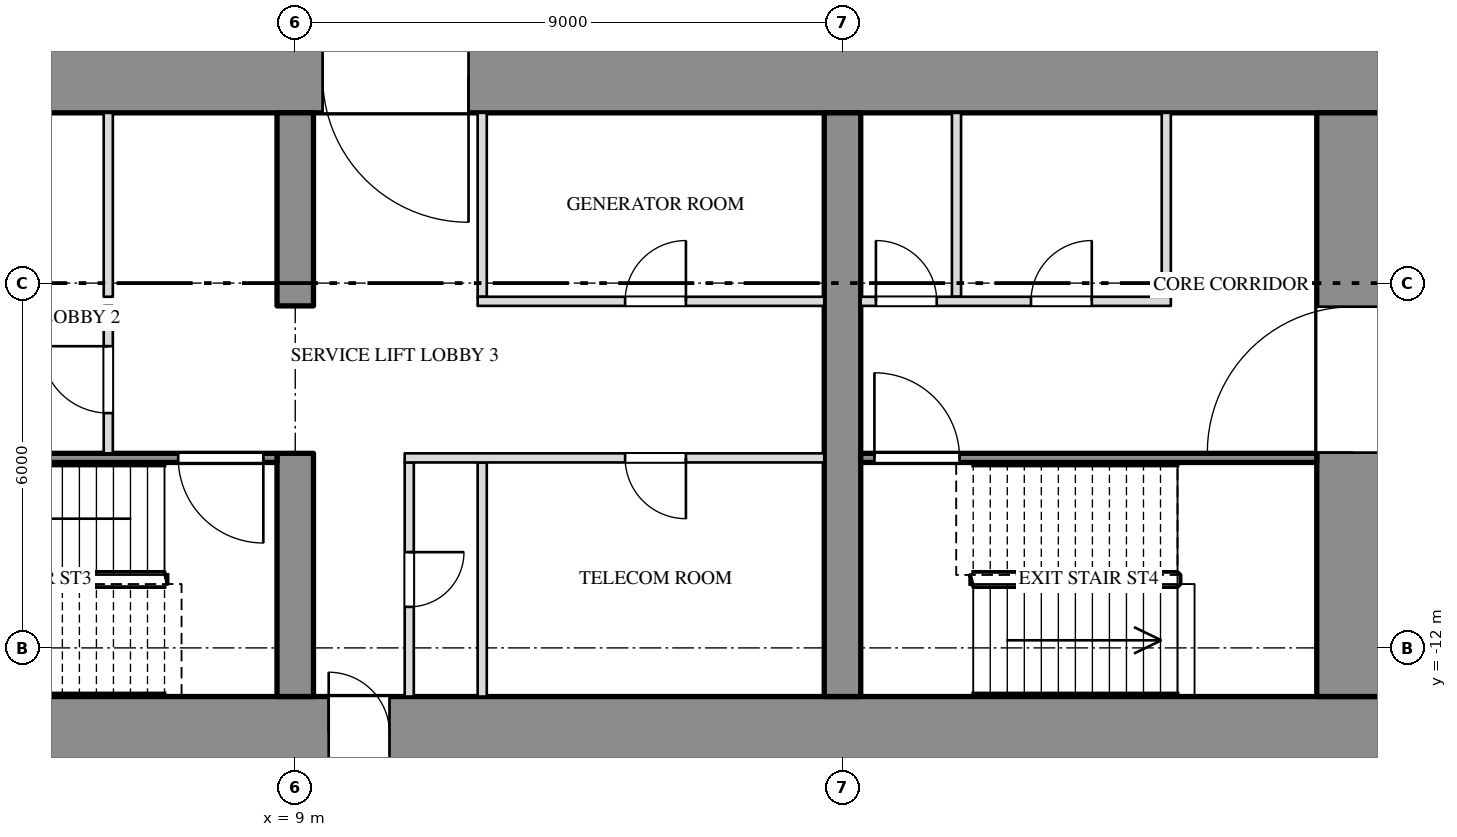
"""IFC4 building model, lengths in metres.
Left out: names, types, materials, properties, quantities, classifications, styles, units other than length and angle.
Written with IfcOpenShell. Run it as: python <this file> out.ifc"""

import sys

from ifc_helpers import new_model, si_unit, direction, frame, frame_2d, origin, place, context, subcontext, project, spatial, rectangle, extrude, element, fill, save


model = new_model("IFC4")
c1 = context("Model", 3, precision=1e-05, world=origin(), true_north=direction((0.0, 1.0)))
c2 = subcontext(c1, "Body", "Model", "MODEL_VIEW")
j1 = project(units=[si_unit("LENGTHUNIT", "METRE"), si_unit("PLANEANGLEUNIT", "RADIAN")], contexts=[c1])
p1 = place(None, origin())
s1 = spatial("IfcSite", under=j1, at=p1, CompositionType="ELEMENT")
p2 = place(p1, origin())
s2 = spatial("IfcBuilding", under=s1, at=p2, CompositionType="ELEMENT")
p3 = place(p2, frame((0.0, 0.0, -12.6)))
s3 = spatial("IfcBuildingStorey", under=s2, at=p3, CompositionType="ELEMENT", Elevation=-12.6)
p4 = place(p3, frame((-27.0, -2.6, 0.0), z_axis=(0.0, 0.0, 1.0), x_axis=(1.0, 0.0, 0.0)))
e1 = element("IfcWall", 1, at=p4, inside=s3, PredefinedType="SHEAR", context=c2, shape_type="SweptSolid", body=[
    extrude(rectangle(XDim=54.0, YDim=1.2, at=frame_2d((27.0, 0.0))), origin(), (0.0, 0.0, 1.0), 3.9),
])
p5 = place(p4, frame((15.15, 0.0, 0.0)))
e2 = element("IfcOpeningElement", 2, at=p5, cuts=e1, PredefinedType="OPENING", context=c2, shape_type="SweptSolid", body=[
    extrude(rectangle(XDim=2.4, YDim=2.1, at=frame_2d((1.2, 1.05))), frame((0.0, 0.612, 0.0), z_axis=(0.0, -1.0, 0.0), x_axis=(1.0, 0.0, 0.0)), (0.0, 0.0, 1.0), 1.224),
])
p6 = place(p4, frame((36.45, 0.0, 0.0)))
e3 = element("IfcOpeningElement", 3, at=p6, cuts=e1, PredefinedType="OPENING", context=c2, shape_type="SweptSolid", body=[
    extrude(rectangle(XDim=2.4, YDim=2.1, at=frame_2d((1.2, 1.05))), frame((0.0, 0.612, 0.0), z_axis=(0.0, -1.0, 0.0), x_axis=(1.0, 0.0, 0.0)), (0.0, 0.0, 1.0), 1.224),
])
p7 = place(p3, frame((-27.0, -13.4, 0.0), z_axis=(0.0, 0.0, 1.0), x_axis=(1.0, 0.0, 0.0)))
e4 = element("IfcWall", 4, at=p7, inside=s3, PredefinedType="SHEAR", context=c2, shape_type="SweptSolid", body=[
    extrude(rectangle(XDim=54.0, YDim=1.2, at=frame_2d((27.0, 0.0))), origin(), (0.0, 0.0, 1.0), 3.9),
])
p8 = place(p7, frame((16.45, 0.0, 0.0)))
e5 = element("IfcOpeningElement", 5, at=p8, cuts=e4, PredefinedType="OPENING", context=c2, shape_type="SweptSolid", body=[
    extrude(rectangle(XDim=1.0, YDim=2.1, at=frame_2d((0.5, 1.05))), frame((0.0, 0.612, 0.0), z_axis=(0.0, -1.0, 0.0), x_axis=(1.0, 0.0, 0.0)), (0.0, 0.0, 1.0), 1.224),
])
p9 = place(p7, frame((36.55, 0.0, 0.0)))
e6 = element("IfcOpeningElement", 6, at=p9, cuts=e4, PredefinedType="OPENING", context=c2, shape_type="SweptSolid", body=[
    extrude(rectangle(XDim=1.0, YDim=2.1, at=frame_2d((0.5, 1.05))), frame((0.0, 0.612, 0.0), z_axis=(0.0, -1.0, 0.0), x_axis=(1.0, 0.0, 0.0)), (0.0, 0.0, 1.0), 1.224),
])
p10 = place(p3, frame((26.4, -12.8, 0.0), z_axis=(0.0, 0.0, 1.0), x_axis=(0.0, 1.0, 0.0)))
e7 = element("IfcWall", 7, at=p10, inside=s3, PredefinedType="SHEAR", context=c2, shape_type="SweptSolid", body=[
    extrude(rectangle(XDim=9.6, YDim=1.2, at=frame_2d((4.8, 0.0))), origin(), (0.0, 0.0, 1.0), 3.9),
])
p11 = place(p10, frame((4.012, 0.0, 0.0)))
e8 = element("IfcOpeningElement", 8, at=p11, cuts=e7, PredefinedType="OPENING", context=c2, shape_type="SweptSolid", body=[
    extrude(rectangle(XDim=2.4, YDim=2.1, at=frame_2d((1.2, 1.05))), frame((0.0, 0.612, 0.0), z_axis=(0.0, -1.0, 0.0), x_axis=(1.0, 0.0, 0.0)), (0.0, 0.0, 1.0), 1.224),
])
p12 = place(p3, frame((9.0, -12.8, 0.0), z_axis=(0.0, 0.0, 1.0), x_axis=(0.0, 1.0, 0.0)))
e9 = element("IfcWall", 9, at=p12, inside=s3, PredefinedType="SHEAR", context=c2, shape_type="SweptSolid", body=[
    extrude(rectangle(XDim=4.0, YDim=0.6, at=frame_2d((2.0, 0.0))), origin(), (0.0, 0.0, 1.0), 3.9),
])
p13 = place(p3, frame((9.0, -6.375, 0.0), z_axis=(0.0, 0.0, 1.0), x_axis=(0.0, 1.0, 0.0)))
e10 = element("IfcWall", 10, at=p13, inside=s3, PredefinedType="SHEAR", context=c2, shape_type="SweptSolid", body=[
    extrude(rectangle(XDim=3.175, YDim=0.6, at=frame_2d((1.587, 0.0))), origin(), (0.0, 0.0, 1.0), 3.9),
])
p14 = place(p3, frame((18.0, -12.8, 0.0), z_axis=(0.0, 0.0, 1.0), x_axis=(0.0, 1.0, 0.0)))
e11 = element("IfcWall", 11, at=p14, inside=s3, PredefinedType="SHEAR", context=c2, shape_type="SweptSolid", body=[
    extrude(rectangle(XDim=9.6, YDim=0.6, at=frame_2d((4.8, 0.0))), origin(), (0.0, 0.0, 1.0), 3.9),
])
for number, where, z_axis, x_axis in (
    (12, (5.925, -6.225, 0.0), (0.0, 0.0, 1.0), (0.0, 1.0, 0.0)),
    (13, (12.075, -6.225, 0.0), (0.0, 0.0, 1.0), (0.0, 1.0, 0.0)),
    (14, (19.875, -6.225, 0.0), (0.0, 0.0, 1.0), (0.0, 1.0, 0.0)),
    (15, (23.325, -6.225, 0.0), (0.0, 0.0, 1.0), (0.0, 1.0, 0.0)),
):
    element("IfcWall", number, at=place(p3, frame(where, z_axis=z_axis, x_axis=x_axis)), inside=s3, PredefinedType="PARTITIONING", context=c2, shape_type="SweptSolid", body=[
        extrude(rectangle(XDim=3.025, YDim=0.15, at=frame_2d((1.513, 0.0))), origin(), (0.0, 0.0, 1.0), 3.9),
    ])
p15 = place(p3, frame((10.875, -12.8, 0.0), z_axis=(0.0, 0.0, 1.0), x_axis=(0.0, 1.0, 0.0)))
e16 = element("IfcWall", 16, at=p15, inside=s3, PredefinedType="PARTITIONING", context=c2, shape_type="SweptSolid", body=[
    extrude(rectangle(XDim=3.85, YDim=0.15, at=frame_2d((1.925, 0.0))), origin(), (0.0, 0.0, 1.0), 3.9),
])
p16 = place(p15, frame((1.475, 0.0, 0.0)))
e17 = element("IfcOpeningElement", 17, at=p16, cuts=e16, PredefinedType="OPENING", context=c2, shape_type="SweptSolid", body=[
    extrude(rectangle(XDim=0.9, YDim=2.1, at=frame_2d((0.45, 1.05))), frame((0.0, 0.087, 0.0), z_axis=(0.0, -1.0, 0.0), x_axis=(1.0, 0.0, 0.0)), (0.0, 0.0, 1.0), 0.174),
])
p17 = place(p3, frame((12.075, -12.8, 0.0), z_axis=(0.0, 0.0, 1.0), x_axis=(0.0, 1.0, 0.0)))
e18 = element("IfcWall", 18, at=p17, inside=s3, PredefinedType="PARTITIONING", context=c2, shape_type="SweptSolid", body=[
    extrude(rectangle(XDim=3.85, YDim=0.15, at=frame_2d((1.925, 0.0))), origin(), (0.0, 0.0, 1.0), 3.9),
])
p18 = place(p3, frame((5.925, -8.8, 0.0), z_axis=(0.0, 0.0, 1.0), x_axis=(0.0, 1.0, 0.0)))
e19 = element("IfcWall", 19, at=p18, inside=s3, PredefinedType="PARTITIONING", context=c2, shape_type="SweptSolid", body=[
    extrude(rectangle(XDim=2.425, YDim=0.15, at=frame_2d((1.212, 0.0))), origin(), (0.0, 0.0, 1.0), 3.9),
])
p19 = place(p18, frame((0.662, 0.0, 0.0)))
e20 = element("IfcOpeningElement", 20, at=p19, cuts=e19, PredefinedType="OPENING", context=c2, shape_type="SweptSolid", body=[
    extrude(rectangle(XDim=1.1, YDim=2.1, at=frame_2d((0.55, 1.05))), frame((0.0, 0.087, 0.0), z_axis=(0.0, -1.0, 0.0), x_axis=(1.0, 0.0, 0.0)), (0.0, 0.0, 1.0), 0.174),
])
p20 = place(p3, frame((12.0, -6.3, 0.0), z_axis=(0.0, 0.0, 1.0), x_axis=(1.0, 0.0, 0.0)))
e21 = element("IfcWall", 21, at=p20, inside=s3, PredefinedType="PARTITIONING", context=c2, shape_type="SweptSolid", body=[
    extrude(rectangle(XDim=5.7, YDim=0.15, at=frame_2d((2.85, 0.0))), origin(), (0.0, 0.0, 1.0), 3.9),
])
p21 = place(p20, frame((2.425, 0.0, 0.0)))
e22 = element("IfcOpeningElement", 22, at=p21, cuts=e21, PredefinedType="OPENING", context=c2, shape_type="SweptSolid", body=[
    extrude(rectangle(XDim=1.0, YDim=2.1, at=frame_2d((0.5, 1.05))), frame((0.0, 0.087, 0.0), z_axis=(0.0, -1.0, 0.0), x_axis=(1.0, 0.0, 0.0)), (0.0, 0.0, 1.0), 0.174),
])
p22 = place(p3, frame((18.3, -6.3, 0.0), z_axis=(0.0, 0.0, 1.0), x_axis=(1.0, 0.0, 0.0)))
e23 = element("IfcWall", 23, at=p22, inside=s3, PredefinedType="PARTITIONING", context=c2, shape_type="SweptSolid", body=[
    extrude(rectangle(XDim=5.1, YDim=0.15, at=frame_2d((2.55, 0.0))), origin(), (0.0, 0.0, 1.0), 3.9),
])
p23 = place(p22, frame((0.25, 0.0, 0.0)))
e24 = element("IfcOpeningElement", 24, at=p23, cuts=e23, PredefinedType="OPENING", context=c2, shape_type="SweptSolid", body=[
    extrude(rectangle(XDim=1.0, YDim=2.1, at=frame_2d((0.5, 1.05))), frame((0.0, 0.087, 0.0), z_axis=(0.0, -1.0, 0.0), x_axis=(1.0, 0.0, 0.0)), (0.0, 0.0, 1.0), 0.174),
])
p24 = place(p22, frame((2.8, 0.0, 0.0)))
e25 = element("IfcOpeningElement", 25, at=p24, cuts=e23, PredefinedType="OPENING", context=c2, shape_type="SweptSolid", body=[
    extrude(rectangle(XDim=1.0, YDim=2.1, at=frame_2d((0.5, 1.05))), frame((0.0, 0.087, 0.0), z_axis=(0.0, -1.0, 0.0), x_axis=(1.0, 0.0, 0.0)), (0.0, 0.0, 1.0), 0.174),
])
p25 = place(p3, frame((0.3, -8.875, 0.0), z_axis=(0.0, 0.0, 1.0), x_axis=(1.0, 0.0, 0.0)))
e26 = element("IfcWall", 26, at=p25, inside=s3, PredefinedType="SHEAR", context=c2, shape_type="SweptSolid", body=[
    extrude(rectangle(XDim=8.4, YDim=0.15, at=frame_2d((4.2, 0.0))), origin(), (0.0, 0.0, 1.0), 3.9),
])
p26 = place(p25, frame((6.775, 0.0, 0.0)))
e27 = element("IfcOpeningElement", 27, at=p26, cuts=e26, PredefinedType="OPENING", context=c2, shape_type="SweptSolid", body=[
    extrude(rectangle(XDim=1.4, YDim=2.1, at=frame_2d((0.7, 1.05))), frame((0.0, 0.087, 0.0), z_axis=(0.0, -1.0, 0.0), x_axis=(1.0, 0.0, 0.0)), (0.0, 0.0, 1.0), 0.174),
])
p27 = place(p3, frame((10.8, -8.875, 0.0), z_axis=(0.0, 0.0, 1.0), x_axis=(1.0, 0.0, 0.0)))
e28 = element("IfcWall", 28, at=p27, inside=s3, PredefinedType="PARTITIONING", context=c2, shape_type="SweptSolid", body=[
    extrude(rectangle(XDim=6.9, YDim=0.15, at=frame_2d((3.45, 0.0))), origin(), (0.0, 0.0, 1.0), 3.9),
])
p28 = place(p27, frame((3.625, 0.0, 0.0)))
e29 = element("IfcOpeningElement", 29, at=p28, cuts=e28, PredefinedType="OPENING", context=c2, shape_type="SweptSolid", body=[
    extrude(rectangle(XDim=1.0, YDim=2.1, at=frame_2d((0.5, 1.05))), frame((0.0, 0.087, 0.0), z_axis=(0.0, -1.0, 0.0), x_axis=(1.0, 0.0, 0.0)), (0.0, 0.0, 1.0), 0.174),
])
p29 = place(p3, frame((18.3, -8.875, 0.0), z_axis=(0.0, 0.0, 1.0), x_axis=(1.0, 0.0, 0.0)))
e30 = element("IfcWall", 30, at=p29, inside=s3, PredefinedType="SHEAR", context=c2, shape_type="SweptSolid", body=[
    extrude(rectangle(XDim=7.5, YDim=0.15, at=frame_2d((3.75, 0.0))), origin(), (0.0, 0.0, 1.0), 3.9),
])
p30 = place(p29, frame((0.225, 0.0, 0.0)))
e31 = element("IfcOpeningElement", 31, at=p30, cuts=e30, PredefinedType="OPENING", context=c2, shape_type="SweptSolid", body=[
    extrude(rectangle(XDim=1.4, YDim=2.1, at=frame_2d((0.7, 1.05))), frame((0.0, 0.087, 0.0), z_axis=(0.0, -1.0, 0.0), x_axis=(1.0, 0.0, 0.0)), (0.0, 0.0, 1.0), 0.174),
])
p31 = place(p19, origin())
e32 = element("IfcDoor", 32, at=p31, inside=s3, OperationType="SINGLE_SWING_RIGHT", PredefinedType="DOOR", context=c2, shape_type="SweptSolid", body=[
    extrude(rectangle(XDim=1.1, YDim=2.1, at=frame_2d((0.55, 1.05))), frame((0.0, 0.025, 0.0), z_axis=(0.0, -1.0, 0.0), x_axis=(1.0, 0.0, 0.0)), (0.0, 0.0, 1.0), 0.05),
])
fill(e20, e32)
p32 = place(p26, origin())
e33 = element("IfcDoor", 33, at=p32, inside=s3, OperationType="DOUBLE_DOOR_SINGLE_SWING", PredefinedType="DOOR", context=c2, shape_type="SweptSolid", body=[
    extrude(rectangle(XDim=1.4, YDim=2.1, at=frame_2d((0.7, 1.05))), frame((0.0, 0.025, 0.0), z_axis=(0.0, -1.0, 0.0), x_axis=(1.0, 0.0, 0.0)), (0.0, 0.0, 1.0), 0.05),
])
fill(e27, e33)
p33 = place(p9, origin())
e34 = element("IfcDoor", 34, at=p33, inside=s3, OperationType="SINGLE_SWING_LEFT", PredefinedType="DOOR", context=c2, shape_type="SweptSolid", body=[
    extrude(rectangle(XDim=1.0, YDim=2.1, at=frame_2d((0.5, 1.05))), frame((0.0, 0.025, 0.0), z_axis=(0.0, -1.0, 0.0), x_axis=(1.0, 0.0, 0.0)), (0.0, 0.0, 1.0), 0.05),
])
fill(e6, e34)
p34 = place(p6, origin())
e35 = element("IfcDoor", 35, at=p34, inside=s3, OperationType="DOUBLE_DOOR_SINGLE_SWING", PredefinedType="DOOR", context=c2, shape_type="SweptSolid", body=[
    extrude(rectangle(XDim=2.4, YDim=2.1, at=frame_2d((1.2, 1.05))), frame((0.0, 0.025, 0.0), z_axis=(0.0, -1.0, 0.0), x_axis=(1.0, 0.0, 0.0)), (0.0, 0.0, 1.0), 0.05),
])
fill(e3, e35)
p35 = place(p16, origin())
e36 = element("IfcDoor", 36, at=p35, inside=s3, OperationType="SINGLE_SWING_LEFT", PredefinedType="DOOR", context=c2, shape_type="SweptSolid", body=[
    extrude(rectangle(XDim=0.9, YDim=2.1, at=frame_2d((0.45, 1.05))), frame((0.0, 0.025, 0.0), z_axis=(0.0, -1.0, 0.0), x_axis=(1.0, 0.0, 0.0)), (0.0, 0.0, 1.0), 0.05),
])
fill(e17, e36)
p36 = place(p28, origin())
e37 = element("IfcDoor", 37, at=p36, inside=s3, OperationType="SINGLE_SWING_LEFT", PredefinedType="DOOR", context=c2, shape_type="SweptSolid", body=[
    extrude(rectangle(XDim=1.0, YDim=2.1, at=frame_2d((0.5, 1.05))), frame((0.0, 0.025, 0.0), z_axis=(0.0, -1.0, 0.0), x_axis=(1.0, 0.0, 0.0)), (0.0, 0.0, 1.0), 0.05),
])
fill(e29, e37)
p37 = place(p21, origin())
e38 = element("IfcDoor", 38, at=p37, inside=s3, OperationType="SINGLE_SWING_RIGHT", PredefinedType="DOOR", context=c2, shape_type="SweptSolid", body=[
    extrude(rectangle(XDim=1.0, YDim=2.1, at=frame_2d((0.5, 1.05))), frame((0.0, 0.025, 0.0), z_axis=(0.0, -1.0, 0.0), x_axis=(1.0, 0.0, 0.0)), (0.0, 0.0, 1.0), 0.05),
])
fill(e22, e38)
p38 = place(p23, origin())
e39 = element("IfcDoor", 39, at=p38, inside=s3, OperationType="SINGLE_SWING_LEFT", PredefinedType="DOOR", context=c2, shape_type="SweptSolid", body=[
    extrude(rectangle(XDim=1.0, YDim=2.1, at=frame_2d((0.5, 1.05))), frame((0.0, 0.025, 0.0), z_axis=(0.0, -1.0, 0.0), x_axis=(1.0, 0.0, 0.0)), (0.0, 0.0, 1.0), 0.05),
])
fill(e24, e39)
p39 = place(p30, origin())
e40 = element("IfcDoor", 40, at=p39, inside=s3, OperationType="DOUBLE_DOOR_SINGLE_SWING", PredefinedType="DOOR", context=c2, shape_type="SweptSolid", body=[
    extrude(rectangle(XDim=1.4, YDim=2.1, at=frame_2d((0.7, 1.05))), frame((0.0, 0.025, 0.0), z_axis=(0.0, -1.0, 0.0), x_axis=(1.0, 0.0, 0.0)), (0.0, 0.0, 1.0), 0.05),
])
fill(e31, e40)
p40 = place(p24, origin())
e41 = element("IfcDoor", 41, at=p40, inside=s3, OperationType="SINGLE_SWING_RIGHT", PredefinedType="DOOR", context=c2, shape_type="SweptSolid", body=[
    extrude(rectangle(XDim=1.0, YDim=2.1, at=frame_2d((0.5, 1.05))), frame((0.0, 0.025, 0.0), z_axis=(0.0, -1.0, 0.0), x_axis=(1.0, 0.0, 0.0)), (0.0, 0.0, 1.0), 0.05),
])
fill(e25, e41)
p41 = place(p11, origin())
e42 = element("IfcDoor", 42, at=p41, inside=s3, OperationType="DOUBLE_DOOR_SINGLE_SWING", PredefinedType="DOOR", context=c2, shape_type="SweptSolid", body=[
    extrude(rectangle(XDim=2.4, YDim=2.1, at=frame_2d((1.2, 1.05))), frame((0.0, 0.025, 0.0), z_axis=(0.0, -1.0, 0.0), x_axis=(1.0, 0.0, 0.0)), (0.0, 0.0, 1.0), 0.05),
])
fill(e8, e42)
save(model, sys.argv[1])
